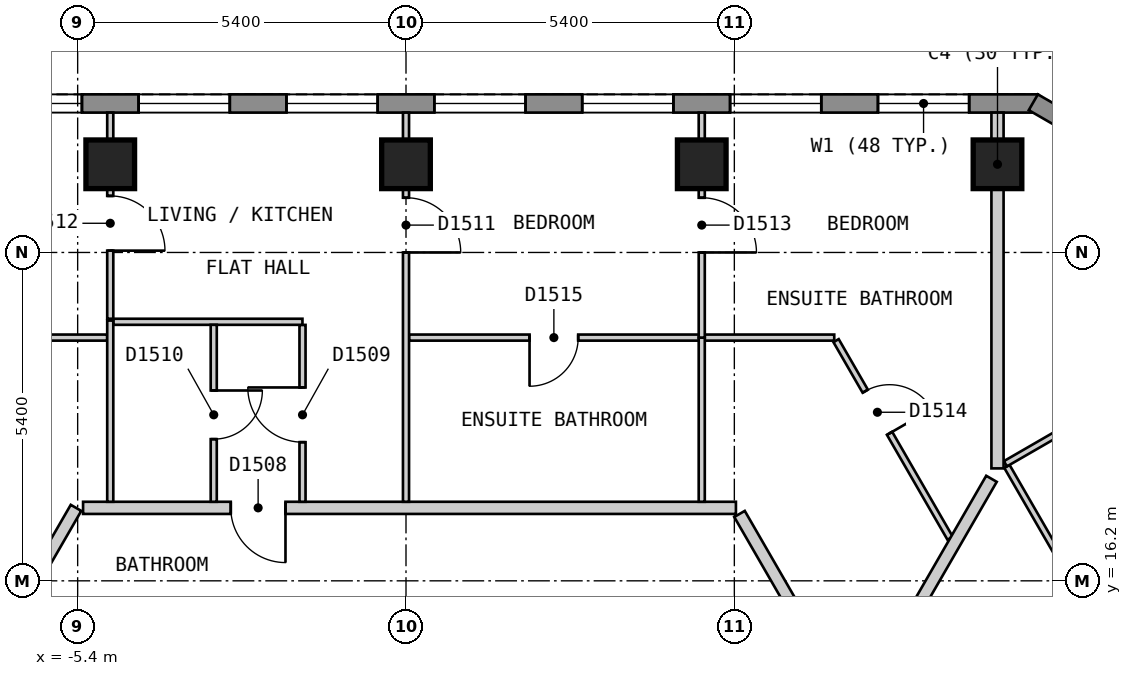
"""IFC4 building model, lengths in metres.
Left out: names, types, materials, properties, quantities, classifications, styles, units other than length and angle.
Written with IfcOpenShell. Run it as: python <this file> out.ifc"""

import sys

from ifc_helpers import new_model, si_unit, direction, frame, frame_2d, origin, origin_2d, place, context, subcontext, project, spatial, polyline, rectangle, outline, extrude, element, fill, save


model = new_model("IFC4")
c1 = context("Model", 3, precision=1e-05, world=origin(), true_north=direction((0.0, 1.0)))
c2 = subcontext(c1, "Body", "Model", "MODEL_VIEW")
j1 = project(units=[si_unit("LENGTHUNIT", "METRE"), si_unit("PLANEANGLEUNIT", "RADIAN")], contexts=[c1])
p1 = place(None, origin())
s1 = spatial("IfcSite", under=j1, at=p1, CompositionType="ELEMENT")
p2 = place(p1, origin())
s2 = spatial("IfcBuilding", under=s1, at=p2, CompositionType="ELEMENT")
p3 = place(p2, frame((0.0, 0.0, 196.2)))
s3 = spatial("IfcBuildingStorey", under=s2, at=p3, CompositionType="ELEMENT", Elevation=196.2)
for number, where, z_axis, x_axis in (
    (1, (9.728, 23.05, 0.0), (0.0, 0.0, 1.0), (-1.0, 0.0, 0.0)),
    (2, (4.864, 23.05, 0.0), (0.0, 0.0, 1.0), (-1.0, 0.0, 0.0)),
    (3, (0.0, 23.05, 0.0), (0.0, 0.0, 1.0), (-1.0, 0.0, 0.0)),
    (4, (-4.864, 23.05, 0.0), (0.0, 0.0, 1.0), (-1.0, 0.0, 0.0)),
):
    element("IfcColumn", number, at=place(p3, frame(where, z_axis=z_axis, x_axis=x_axis)), inside=s3, PredefinedType="COLUMN", context=c2, shape_type="SweptSolid", body=[
        extrude(rectangle(XDim=0.8, YDim=0.8, at=origin_2d()), origin(), (0.0, 0.0, 1.0), 3.0),
    ])
p4 = place(p3, frame((10.392, 24.05, 0.0), z_axis=(0.0, 0.0, 1.0), x_axis=(-1.0, 0.0, 0.0)))
e5 = element("IfcWall", 5, at=p4, inside=s3, PredefinedType="SOLIDWALL", context=c2, shape_type="SweptSolid", body=[
    extrude(outline(polyline([(0.0, -0.15), (20.784, -0.15), (20.704, 0.15), (0.08, 0.15), (0.0, -0.15)])), origin(), (0.0, 0.0, 1.0), 2.6),
])
p5 = place(p4, frame((1.13, 0.0, 0.15)))
e6 = element("IfcOpeningElement", 6, at=p5, cuts=e5, PredefinedType="OPENING", context=c2, shape_type="SweptSolid", body=[
    extrude(rectangle(XDim=1.5, YDim=2.1, at=frame_2d((0.75, 1.05))), frame((0.0, 0.16, 0.0), z_axis=(0.0, -1.0, 0.0), x_axis=(1.0, 0.0, 0.0)), (0.0, 0.0, 1.0), 0.32),
])
p6 = place(p4, frame((3.562, 0.0, 0.15)))
e7 = element("IfcOpeningElement", 7, at=p6, cuts=e5, PredefinedType="OPENING", context=c2, shape_type="SweptSolid", body=[
    extrude(rectangle(XDim=1.5, YDim=2.1, at=frame_2d((0.75, 1.05))), frame((0.0, 0.16, 0.0), z_axis=(0.0, -1.0, 0.0), x_axis=(1.0, 0.0, 0.0)), (0.0, 0.0, 1.0), 0.32),
])
p7 = place(p4, frame((5.994, 0.0, 0.15)))
e8 = element("IfcOpeningElement", 8, at=p7, cuts=e5, PredefinedType="OPENING", context=c2, shape_type="SweptSolid", body=[
    extrude(rectangle(XDim=1.5, YDim=2.1, at=frame_2d((0.75, 1.05))), frame((0.0, 0.16, 0.0), z_axis=(0.0, -1.0, 0.0), x_axis=(1.0, 0.0, 0.0)), (0.0, 0.0, 1.0), 0.32),
])
p8 = place(p4, frame((8.426, 0.0, 0.15)))
e9 = element("IfcOpeningElement", 9, at=p8, cuts=e5, PredefinedType="OPENING", context=c2, shape_type="SweptSolid", body=[
    extrude(rectangle(XDim=1.5, YDim=2.1, at=frame_2d((0.75, 1.05))), frame((0.0, 0.16, 0.0), z_axis=(0.0, -1.0, 0.0), x_axis=(1.0, 0.0, 0.0)), (0.0, 0.0, 1.0), 0.32),
])
p9 = place(p4, frame((10.858, 0.0, 0.15)))
e10 = element("IfcOpeningElement", 10, at=p9, cuts=e5, PredefinedType="OPENING", context=c2, shape_type="SweptSolid", body=[
    extrude(rectangle(XDim=1.5, YDim=2.1, at=frame_2d((0.75, 1.05))), frame((0.0, 0.16, 0.0), z_axis=(0.0, -1.0, 0.0), x_axis=(1.0, 0.0, 0.0)), (0.0, 0.0, 1.0), 0.32),
])
p10 = place(p4, frame((13.29, 0.0, 0.15)))
e11 = element("IfcOpeningElement", 11, at=p10, cuts=e5, PredefinedType="OPENING", context=c2, shape_type="SweptSolid", body=[
    extrude(rectangle(XDim=1.5, YDim=2.1, at=frame_2d((0.75, 1.05))), frame((0.0, 0.16, 0.0), z_axis=(0.0, -1.0, 0.0), x_axis=(1.0, 0.0, 0.0)), (0.0, 0.0, 1.0), 0.32),
])
p11 = place(p4, frame((15.722, 0.0, 0.15)))
e12 = element("IfcOpeningElement", 12, at=p11, cuts=e5, PredefinedType="OPENING", context=c2, shape_type="SweptSolid", body=[
    extrude(rectangle(XDim=1.5, YDim=2.1, at=frame_2d((0.75, 1.05))), frame((0.0, 0.16, 0.0), z_axis=(0.0, -1.0, 0.0), x_axis=(1.0, 0.0, 0.0)), (0.0, 0.0, 1.0), 0.32),
])
p12 = place(p4, frame((18.154, 0.0, 0.15)))
e13 = element("IfcOpeningElement", 13, at=p12, cuts=e5, PredefinedType="OPENING", context=c2, shape_type="SweptSolid", body=[
    extrude(rectangle(XDim=1.5, YDim=2.1, at=frame_2d((0.75, 1.05))), frame((0.0, 0.16, 0.0), z_axis=(0.0, -1.0, 0.0), x_axis=(1.0, 0.0, 0.0)), (0.0, 0.0, 1.0), 0.32),
])
p13 = place(p3, frame((14.647, 21.57, 0.0), z_axis=(0.0, 0.0, 1.0), x_axis=(-0.866022959057, 0.500004234368, 0.0)))
e14 = element("IfcWall", 14, at=p13, inside=s3, PredefinedType="SOLIDWALL", context=c2, shape_type="SweptSolid", body=[
    extrude(outline(polyline([(0.0, -0.15), (5.0, -0.15), (4.92, 0.15), (0.08, 0.15), (0.0, -0.15)])), origin(), (0.0, 0.0, 1.0), 2.6),
])
p14 = place(p13, frame((0.65, 0.0, 0.15)))
e15 = element("IfcOpeningElement", 15, at=p14, cuts=e14, PredefinedType="OPENING", context=c2, shape_type="SweptSolid", body=[
    extrude(rectangle(XDim=1.2, YDim=2.1, at=frame_2d((0.6, 1.05))), frame((0.0, 0.16, 0.0), z_axis=(0.0, -1.0, 0.0), x_axis=(1.0, 0.0, 0.0)), (0.0, 0.0, 1.0), 0.32),
])
p15 = place(p13, frame((3.15, 0.0, 0.15)))
e16 = element("IfcOpeningElement", 16, at=p15, cuts=e14, PredefinedType="OPENING", context=c2, shape_type="SweptSolid", body=[
    extrude(rectangle(XDim=1.2, YDim=2.1, at=frame_2d((0.6, 1.05))), frame((0.0, 0.16, 0.0), z_axis=(0.0, -1.0, 0.0), x_axis=(1.0, 0.0, 0.0)), (0.0, 0.0, 1.0), 0.32),
])
p16 = place(p3, frame((5.485, 17.3, 0.0), z_axis=(0.0, 0.0, 1.0), x_axis=(0.499998905622, -0.866026035623, 0.0)))
e17 = element("IfcWall", 17, at=p16, inside=s3, PredefinedType="PARTITIONING", context=c2, shape_type="SweptSolid", body=[
    extrude(rectangle(XDim=10.524, YDim=0.2, at=frame_2d((5.262, 0.0))), origin(), (0.0, 0.0, 1.0), 2.6),
])
p17 = place(p16, frame((8.974, 0.0, 0.0)))
e18 = element("IfcOpeningElement", 18, at=p17, cuts=e17, PredefinedType="OPENING", context=c2, shape_type="SweptSolid", body=[
    extrude(rectangle(XDim=1.0, YDim=2.1, at=frame_2d((0.5, 1.05))), frame((0.0, 0.11, 0.0), z_axis=(0.0, -1.0, 0.0), x_axis=(1.0, 0.0, 0.0)), (0.0, 0.0, 1.0), 0.22),
])
p18 = place(p3, frame((-5.311, 17.4, 0.0), z_axis=(0.0, 0.0, 1.0), x_axis=(1.0, 0.0, 0.0)))
e19 = element("IfcWall", 19, at=p18, inside=s3, PredefinedType="PARTITIONING", context=c2, shape_type="SweptSolid", body=[
    extrude(rectangle(XDim=10.737, YDim=0.2, at=frame_2d((5.369, 0.0))), origin(), (0.0, 0.0, 1.0), 2.6),
])
p19 = place(p18, frame((2.429, 0.0, 0.0)))
e20 = element("IfcOpeningElement", 20, at=p19, cuts=e19, PredefinedType="OPENING", context=c2, shape_type="SweptSolid", body=[
    extrude(rectangle(XDim=0.9, YDim=2.1, at=frame_2d((0.45, 1.05))), frame((0.0, 0.11, 0.0), z_axis=(0.0, -1.0, 0.0), x_axis=(1.0, 0.0, 0.0)), (0.0, 0.0, 1.0), 0.22),
])
p20 = place(p3, frame((-10.854, 8.0, 0.0), z_axis=(0.0, 0.0, 1.0), x_axis=(0.499997637144, 0.866026767976, 0.0)))
e21 = element("IfcWall", 21, at=p20, inside=s3, PredefinedType="PARTITIONING", context=c2, shape_type="SweptSolid", body=[
    extrude(rectangle(XDim=10.854, YDim=0.2, at=frame_2d((5.427, 0.0))), origin(), (0.0, 0.0, 1.0), 2.6),
])
p21 = place(p20, frame((0.721, 0.0, 0.0)))
e22 = element("IfcOpeningElement", 22, at=p21, cuts=e21, PredefinedType="OPENING", context=c2, shape_type="SweptSolid", body=[
    extrude(rectangle(XDim=1.0, YDim=2.1, at=frame_2d((0.5, 1.05))), frame((0.0, 0.11, 0.0), z_axis=(0.0, -1.0, 0.0), x_axis=(1.0, 0.0, 0.0)), (0.0, 0.0, 1.0), 0.22),
])
p22 = place(p3, frame((7.073, 20.15, 0.0), z_axis=(0.0, 0.0, 1.0), x_axis=(0.499917691695, -0.866072919292, 0.0)))
e23 = element("IfcWall", 23, at=p22, inside=s3, PredefinedType="PARTITIONING", context=c2, shape_type="SweptSolid", body=[
    extrude(rectangle(XDim=3.753, YDim=0.1, at=frame_2d((1.876, 0.0))), origin(), (0.0, 0.0, 1.0), 2.6),
])
p23 = place(p22, frame((0.96, 0.0, 0.0)))
e24 = element("IfcOpeningElement", 24, at=p23, cuts=e23, PredefinedType="OPENING", context=c2, shape_type="SweptSolid", body=[
    extrude(rectangle(XDim=0.8, YDim=2.1, at=frame_2d((0.4, 1.05))), frame((0.0, 0.06, 0.0), z_axis=(0.0, -1.0, 0.0), x_axis=(1.0, 0.0, 0.0)), (0.0, 0.0, 1.0), 0.12),
])
p24 = place(p3, frame((9.883, 18.082, 0.0), z_axis=(0.0, 0.0, 1.0), x_axis=(0.500004428835, -0.86602284678, 0.0)))
e25 = element("IfcWall", 25, at=p24, inside=s3, PredefinedType="PARTITIONING", context=c2, shape_type="SweptSolid", body=[
    extrude(rectangle(XDim=10.618, YDim=0.1, at=frame_2d((5.309, 0.0))), origin(), (0.0, 0.0, 1.0), 2.6),
])
p25 = place(p24, frame((7.657, 0.0, 0.0)))
e26 = element("IfcOpeningElement", 26, at=p25, cuts=e25, PredefinedType="OPENING", context=c2, shape_type="SweptSolid", body=[
    extrude(rectangle(XDim=0.9, YDim=2.1, at=frame_2d((0.45, 1.05))), frame((0.0, 0.06, 0.0), z_axis=(0.0, -1.0, 0.0), x_axis=(1.0, 0.0, 0.0)), (0.0, 0.0, 1.0), 0.12),
])
p26 = place(p24, frame((2.242, 0.0, 0.0)))
e27 = element("IfcOpeningElement", 27, at=p26, cuts=e25, PredefinedType="OPENING", context=c2, shape_type="SweptSolid", body=[
    extrude(rectangle(XDim=0.8, YDim=2.1, at=frame_2d((0.4, 1.05))), frame((0.0, 0.06, 0.0), z_axis=(0.0, -1.0, 0.0), x_axis=(1.0, 0.0, 0.0)), (0.0, 0.0, 1.0), 0.12),
])
p27 = place(p3, frame((-4.864, 23.9, 0.0), z_axis=(0.0, 0.0, 1.0), x_axis=(0.0, -1.0, 0.0)))
e28 = element("IfcWall", 28, at=p27, inside=s3, PredefinedType="PARTITIONING", context=c2, shape_type="SweptSolid", body=[
    extrude(rectangle(XDim=3.39, YDim=0.1, at=frame_2d((1.695, 0.0))), origin(), (0.0, 0.0, 1.0), 2.6),
])
p28 = place(p27, frame((1.37, 0.0, 0.0)))
e29 = element("IfcOpeningElement", 29, at=p28, cuts=e28, PredefinedType="OPENING", context=c2, shape_type="SweptSolid", body=[
    extrude(rectangle(XDim=0.9, YDim=2.1, at=frame_2d((0.45, 1.05))), frame((0.0, 0.06, 0.0), z_axis=(0.0, -1.0, 0.0), x_axis=(1.0, 0.0, 0.0)), (0.0, 0.0, 1.0), 0.12),
])
p29 = place(p3, frame((-1.702, 20.409, 0.0), z_axis=(0.0, 0.0, 1.0), x_axis=(0.0, -1.0, 0.0)))
e30 = element("IfcWall", 30, at=p29, inside=s3, PredefinedType="PARTITIONING", context=c2, shape_type="SweptSolid", body=[
    extrude(rectangle(XDim=2.909, YDim=0.1, at=frame_2d((1.455, 0.0))), origin(), (0.0, 0.0, 1.0), 2.6),
])
p30 = place(p29, frame((1.029, 0.0, 0.0)))
e31 = element("IfcOpeningElement", 31, at=p30, cuts=e30, PredefinedType="OPENING", context=c2, shape_type="SweptSolid", body=[
    extrude(rectangle(XDim=0.9, YDim=2.1, at=frame_2d((0.45, 1.05))), frame((0.0, 0.06, 0.0), z_axis=(0.0, -1.0, 0.0), x_axis=(1.0, 0.0, 0.0)), (0.0, 0.0, 1.0), 0.12),
])
p31 = place(p3, frame((-6.985, 20.2, 0.0), z_axis=(0.0, 0.0, 1.0), x_axis=(1.0, 0.0, 0.0)))
e32 = element("IfcWall", 32, at=p31, inside=s3, PredefinedType="PARTITIONING", context=c2, shape_type="SweptSolid", body=[
    extrude(rectangle(XDim=2.071, YDim=0.1, at=frame_2d((1.036, 0.0))), origin(), (0.0, 0.0, 1.0), 2.6),
])
p32 = place(p3, frame((0.05, 20.2, 0.0), z_axis=(0.0, 0.0, 1.0), x_axis=(1.0, 0.0, 0.0)))
e33 = element("IfcWall", 33, at=p32, inside=s3, PredefinedType="PARTITIONING", context=c2, shape_type="SweptSolid", body=[
    extrude(rectangle(XDim=6.993, YDim=0.1, at=frame_2d((3.497, 0.0))), origin(), (0.0, 0.0, 1.0), 2.6),
])
p33 = place(p32, frame((1.982, 0.0, 0.0)))
e34 = element("IfcOpeningElement", 34, at=p33, cuts=e33, PredefinedType="OPENING", context=c2, shape_type="SweptSolid", body=[
    extrude(rectangle(XDim=0.8, YDim=2.1, at=frame_2d((0.4, 1.05))), frame((0.0, 0.06, 0.0), z_axis=(0.0, -1.0, 0.0), x_axis=(1.0, 0.0, 0.0)), (0.0, 0.0, 1.0), 0.12),
])
p34 = place(p3, frame((-4.814, 20.46, 0.0), z_axis=(0.0, 0.0, 1.0), x_axis=(1.0, 0.0, 0.0)))
e35 = element("IfcWall", 35, at=p34, inside=s3, PredefinedType="PARTITIONING", context=c2, shape_type="SweptSolid", body=[
    extrude(rectangle(XDim=3.111, YDim=0.1, at=frame_2d((1.556, 0.0))), origin(), (0.0, 0.0, 1.0), 2.6),
])
p35 = place(p3, frame((4.864, 17.5, 0.0), z_axis=(0.0, 0.0, 1.0), x_axis=(0.0, 1.0, 0.0)))
e36 = element("IfcWall", 36, at=p35, inside=s3, PredefinedType="PARTITIONING", context=c2, shape_type="SweptSolid", body=[
    extrude(rectangle(XDim=2.7, YDim=0.1, at=frame_2d((1.35, 0.0))), origin(), (0.0, 0.0, 1.0), 2.6),
])
p36 = place(p3, frame((0.0, 17.5, 0.0), z_axis=(0.0, 0.0, 1.0), x_axis=(0.0, 1.0, 0.0)))
e37 = element("IfcWall", 37, at=p36, inside=s3, PredefinedType="PARTITIONING", context=c2, shape_type="SweptSolid", body=[
    extrude(rectangle(XDim=6.4, YDim=0.1, at=frame_2d((3.2, 0.0))), origin(), (0.0, 0.0, 1.0), 2.6),
])
p37 = place(p36, frame((4.1, 0.0, 0.0)))
e38 = element("IfcOpeningElement", 38, at=p37, cuts=e37, PredefinedType="OPENING", context=c2, shape_type="SweptSolid", body=[
    extrude(rectangle(XDim=0.9, YDim=2.1, at=frame_2d((0.45, 1.05))), frame((0.0, 0.06, 0.0), z_axis=(0.0, -1.0, 0.0), x_axis=(1.0, 0.0, 0.0)), (0.0, 0.0, 1.0), 0.12),
])
p38 = place(p3, frame((-3.162, 17.5, 0.0), z_axis=(0.0, 0.0, 1.0), x_axis=(0.0, 1.0, 0.0)))
e39 = element("IfcWall", 39, at=p38, inside=s3, PredefinedType="PARTITIONING", context=c2, shape_type="SweptSolid", body=[
    extrude(rectangle(XDim=2.91, YDim=0.1, at=frame_2d((1.455, 0.0))), origin(), (0.0, 0.0, 1.0), 2.6),
])
p39 = place(p38, frame((1.03, 0.0, 0.0)))
e40 = element("IfcOpeningElement", 40, at=p39, cuts=e39, PredefinedType="OPENING", context=c2, shape_type="SweptSolid", body=[
    extrude(rectangle(XDim=0.8, YDim=2.1, at=frame_2d((0.4, 1.05))), frame((0.0, 0.06, 0.0), z_axis=(0.0, -1.0, 0.0), x_axis=(1.0, 0.0, 0.0)), (0.0, 0.0, 1.0), 0.12),
])
p40 = place(p3, frame((-4.864, 17.5, 0.0), z_axis=(0.0, 0.0, 1.0), x_axis=(0.0, 1.0, 0.0)))
e41 = element("IfcWall", 41, at=p40, inside=s3, PredefinedType="PARTITIONING", context=c2, shape_type="SweptSolid", body=[
    extrude(rectangle(XDim=2.98, YDim=0.1, at=frame_2d((1.49, 0.0))), origin(), (0.0, 0.0, 1.0), 2.6),
])
p41 = place(p3, frame((9.858, 18.125, 0.0), z_axis=(0.0, 0.0, 1.0), x_axis=(0.866004402611, 0.500036373335, 0.0)))
e42 = element("IfcWall", 42, at=p41, inside=s3, PredefinedType="PARTITIONING", context=c2, shape_type="SweptSolid", body=[
    extrude(rectangle(XDim=5.7, YDim=0.1, at=frame_2d((2.85, 0.0))), origin(), (0.0, 0.0, 1.0), 2.6),
])
p42 = place(p41, frame((2.4, 0.0, 0.0)))
e43 = element("IfcOpeningElement", 43, at=p42, cuts=e42, PredefinedType="OPENING", context=c2, shape_type="SweptSolid", body=[
    extrude(rectangle(XDim=0.9, YDim=2.1, at=frame_2d((0.45, 1.05))), frame((0.0, 0.06, 0.0), z_axis=(0.0, -1.0, 0.0), x_axis=(1.0, 0.0, 0.0)), (0.0, 0.0, 1.0), 0.12),
])
p43 = place(p3, frame((7.448, 14.1, 0.0), z_axis=(0.0, 0.0, 1.0), x_axis=(0.499961462843, 0.866047652079, 0.0)))
e44 = element("IfcWall", 44, at=p43, inside=s3, PredefinedType="PARTITIONING", context=c2, shape_type="SweptSolid", body=[
    extrude(rectangle(XDim=4.362, YDim=0.2, at=frame_2d((2.181, 0.0))), origin(), (0.0, 0.0, 1.0), 2.6),
])
p44 = place(p3, frame((9.728, 18.049, 0.0), z_axis=(0.0, 0.0, 1.0), x_axis=(0.0, 1.0, 0.0)))
e45 = element("IfcWall", 45, at=p44, inside=s3, PredefinedType="PARTITIONING", context=c2, shape_type="SweptSolid", body=[
    extrude(rectangle(XDim=5.851, YDim=0.2, at=frame_2d((2.925, 0.0))), origin(), (0.0, 0.0, 1.0), 2.6),
])
p45 = place(p3, frame((4.864, 20.2, 0.0), z_axis=(0.0, 0.0, 1.0), x_axis=(0.0, 1.0, 0.0)))
e46 = element("IfcWall", 46, at=p45, inside=s3, PredefinedType="PARTITIONING", context=c2, shape_type="SweptSolid", body=[
    extrude(rectangle(XDim=3.7, YDim=0.1, at=frame_2d((1.85, 0.0))), origin(), (0.0, 0.0, 1.0), 2.6),
])
p46 = place(p45, frame((1.4, 0.0, 0.0)))
e47 = element("IfcOpeningElement", 47, at=p46, cuts=e46, PredefinedType="OPENING", context=c2, shape_type="SweptSolid", body=[
    extrude(rectangle(XDim=0.9, YDim=2.1, at=frame_2d((0.45, 1.05))), frame((0.0, 0.06, 0.0), z_axis=(0.0, -1.0, 0.0), x_axis=(1.0, 0.0, 0.0)), (0.0, 0.0, 1.0), 0.12),
])
p47 = place(p5, origin())
e48 = element("IfcWindow", 48, at=p47, inside=s3, PartitioningType="SINGLE_PANEL", PredefinedType="WINDOW", context=c2, shape_type="SweptSolid", body=[
    extrude(rectangle(XDim=1.5, YDim=2.1, at=frame_2d((0.75, 1.05))), frame((0.0, 0.03, 0.0), z_axis=(0.0, -1.0, 0.0), x_axis=(1.0, 0.0, 0.0)), (0.0, 0.0, 1.0), 0.06),
])
fill(e6, e48)
p48 = place(p6, origin())
e49 = element("IfcWindow", 49, at=p48, inside=s3, PartitioningType="SINGLE_PANEL", PredefinedType="WINDOW", context=c2, shape_type="SweptSolid", body=[
    extrude(rectangle(XDim=1.5, YDim=2.1, at=frame_2d((0.75, 1.05))), frame((0.0, 0.03, 0.0), z_axis=(0.0, -1.0, 0.0), x_axis=(1.0, 0.0, 0.0)), (0.0, 0.0, 1.0), 0.06),
])
fill(e7, e49)
p49 = place(p7, origin())
e50 = element("IfcWindow", 50, at=p49, inside=s3, PartitioningType="SINGLE_PANEL", PredefinedType="WINDOW", context=c2, shape_type="SweptSolid", body=[
    extrude(rectangle(XDim=1.5, YDim=2.1, at=frame_2d((0.75, 1.05))), frame((0.0, 0.03, 0.0), z_axis=(0.0, -1.0, 0.0), x_axis=(1.0, 0.0, 0.0)), (0.0, 0.0, 1.0), 0.06),
])
fill(e8, e50)
p50 = place(p8, origin())
e51 = element("IfcWindow", 51, at=p50, inside=s3, PartitioningType="SINGLE_PANEL", PredefinedType="WINDOW", context=c2, shape_type="SweptSolid", body=[
    extrude(rectangle(XDim=1.5, YDim=2.1, at=frame_2d((0.75, 1.05))), frame((0.0, 0.03, 0.0), z_axis=(0.0, -1.0, 0.0), x_axis=(1.0, 0.0, 0.0)), (0.0, 0.0, 1.0), 0.06),
])
fill(e9, e51)
p51 = place(p9, origin())
e52 = element("IfcWindow", 52, at=p51, inside=s3, PartitioningType="SINGLE_PANEL", PredefinedType="WINDOW", context=c2, shape_type="SweptSolid", body=[
    extrude(rectangle(XDim=1.5, YDim=2.1, at=frame_2d((0.75, 1.05))), frame((0.0, 0.03, 0.0), z_axis=(0.0, -1.0, 0.0), x_axis=(1.0, 0.0, 0.0)), (0.0, 0.0, 1.0), 0.06),
])
fill(e10, e52)
p52 = place(p10, origin())
e53 = element("IfcWindow", 53, at=p52, inside=s3, PartitioningType="SINGLE_PANEL", PredefinedType="WINDOW", context=c2, shape_type="SweptSolid", body=[
    extrude(rectangle(XDim=1.5, YDim=2.1, at=frame_2d((0.75, 1.05))), frame((0.0, 0.03, 0.0), z_axis=(0.0, -1.0, 0.0), x_axis=(1.0, 0.0, 0.0)), (0.0, 0.0, 1.0), 0.06),
])
fill(e11, e53)
p53 = place(p11, origin())
e54 = element("IfcWindow", 54, at=p53, inside=s3, PartitioningType="SINGLE_PANEL", PredefinedType="WINDOW", context=c2, shape_type="SweptSolid", body=[
    extrude(rectangle(XDim=1.5, YDim=2.1, at=frame_2d((0.75, 1.05))), frame((0.0, 0.03, 0.0), z_axis=(0.0, -1.0, 0.0), x_axis=(1.0, 0.0, 0.0)), (0.0, 0.0, 1.0), 0.06),
])
fill(e12, e54)
p54 = place(p19, origin())
e55 = element("IfcDoor", 55, at=p54, inside=s3, OperationType="SINGLE_SWING_RIGHT", PredefinedType="DOOR", context=c2, shape_type="SweptSolid", body=[
    extrude(rectangle(XDim=0.9, YDim=2.1, at=frame_2d((0.45, 1.05))), frame((0.0, 0.025, 0.0), z_axis=(0.0, -1.0, 0.0), x_axis=(1.0, 0.0, 0.0)), (0.0, 0.0, 1.0), 0.05),
])
fill(e20, e55)
p55 = place(p30, origin())
e56 = element("IfcDoor", 56, at=p55, inside=s3, OperationType="SINGLE_SWING_LEFT", PredefinedType="DOOR", context=c2, shape_type="SweptSolid", body=[
    extrude(rectangle(XDim=0.9, YDim=2.1, at=frame_2d((0.45, 1.05))), frame((0.0, 0.025, 0.0), z_axis=(0.0, -1.0, 0.0), x_axis=(1.0, 0.0, 0.0)), (0.0, 0.0, 1.0), 0.05),
])
fill(e31, e56)
p56 = place(p39, origin())
e57 = element("IfcDoor", 57, at=p56, inside=s3, OperationType="SINGLE_SWING_RIGHT", PredefinedType="DOOR", context=c2, shape_type="SweptSolid", body=[
    extrude(rectangle(XDim=0.8, YDim=2.1, at=frame_2d((0.4, 1.05))), frame((0.0, 0.025, 0.0), z_axis=(0.0, -1.0, 0.0), x_axis=(1.0, 0.0, 0.0)), (0.0, 0.0, 1.0), 0.05),
])
fill(e40, e57)
p57 = place(p37, origin())
e58 = element("IfcDoor", 58, at=p57, inside=s3, OperationType="SINGLE_SWING_LEFT", PredefinedType="DOOR", context=c2, shape_type="SweptSolid", body=[
    extrude(rectangle(XDim=0.9, YDim=2.1, at=frame_2d((0.45, 1.05))), frame((0.0, 0.025, 0.0), z_axis=(0.0, -1.0, 0.0), x_axis=(1.0, 0.0, 0.0)), (0.0, 0.0, 1.0), 0.05),
])
fill(e38, e58)
p58 = place(p28, origin())
e59 = element("IfcDoor", 59, at=p58, inside=s3, OperationType="SINGLE_SWING_RIGHT", PredefinedType="DOOR", context=c2, shape_type="SweptSolid", body=[
    extrude(rectangle(XDim=0.9, YDim=2.1, at=frame_2d((0.45, 1.05))), frame((0.0, 0.025, 0.0), z_axis=(0.0, -1.0, 0.0), x_axis=(1.0, 0.0, 0.0)), (0.0, 0.0, 1.0), 0.05),
])
fill(e29, e59)
p59 = place(p46, origin())
e60 = element("IfcDoor", 60, at=p59, inside=s3, OperationType="SINGLE_SWING_LEFT", PredefinedType="DOOR", context=c2, shape_type="SweptSolid", body=[
    extrude(rectangle(XDim=0.9, YDim=2.1, at=frame_2d((0.45, 1.05))), frame((0.0, 0.025, 0.0), z_axis=(0.0, -1.0, 0.0), x_axis=(1.0, 0.0, 0.0)), (0.0, 0.0, 1.0), 0.05),
])
fill(e47, e60)
p60 = place(p23, origin())
e61 = element("IfcDoor", 61, at=p60, inside=s3, OperationType="SINGLE_SWING_RIGHT", PredefinedType="DOOR", context=c2, shape_type="SweptSolid", body=[
    extrude(rectangle(XDim=0.8, YDim=2.1, at=frame_2d((0.4, 1.05))), frame((0.0, 0.025, 0.0), z_axis=(0.0, -1.0, 0.0), x_axis=(1.0, 0.0, 0.0)), (0.0, 0.0, 1.0), 0.05),
])
fill(e24, e61)
p61 = place(p33, origin())
e62 = element("IfcDoor", 62, at=p61, inside=s3, OperationType="SINGLE_SWING_LEFT", PredefinedType="DOOR", context=c2, shape_type="SweptSolid", body=[
    extrude(rectangle(XDim=0.8, YDim=2.1, at=frame_2d((0.4, 1.05))), frame((0.0, 0.025, 0.0), z_axis=(0.0, -1.0, 0.0), x_axis=(1.0, 0.0, 0.0)), (0.0, 0.0, 1.0), 0.05),
])
fill(e34, e62)
save(model, sys.argv[1])
